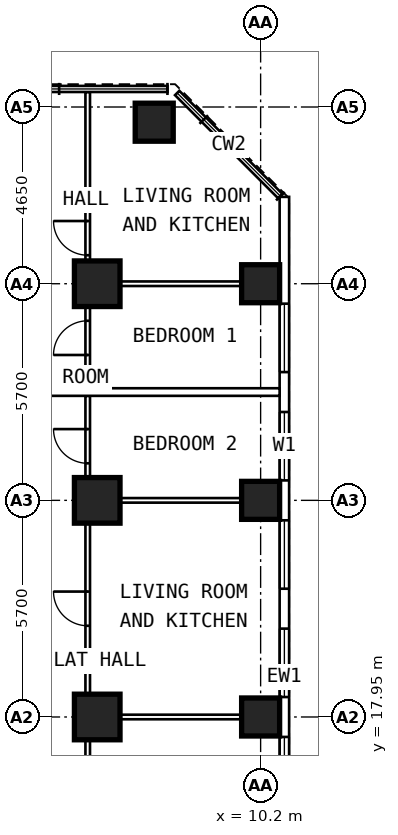
"""IFC4 building model, lengths in metres.
Left out: names, types, materials, properties, quantities, classifications, styles, units other than length and angle.
Written with IfcOpenShell. Run it as: python <this file> out.ifc"""

import sys

from ifc_helpers import new_model, si_unit, direction, frame, frame_2d, origin, origin_2d, place, context, subcontext, project, spatial, rectangle, extrude, element, fill, save


model = new_model("IFC4")
c1 = context("Model", 3, precision=1e-05, world=origin(), true_north=direction((0.0, 1.0)))
c2 = subcontext(c1, "Body", "Model", "MODEL_VIEW")
j1 = project(units=[si_unit("LENGTHUNIT", "METRE"), si_unit("PLANEANGLEUNIT", "RADIAN")], contexts=[c1])
p1 = place(None, origin())
s1 = spatial("IfcSite", under=j1, at=p1, CompositionType="ELEMENT")
p2 = place(p1, origin())
s2 = spatial("IfcBuilding", under=s1, at=p2, CompositionType="ELEMENT")
p3 = place(p2, frame((0.0, 0.0, 68.2)))
s3 = spatial("IfcBuildingStorey", under=s2, at=p3, CompositionType="ELEMENT", Elevation=68.2)
for number, where, z_axis, x_axis in (
    (1, (10.2, 17.95, 0.0), (0.0, 0.0, 1.0), (0.0, 1.0, 0.0)),
    (2, (10.2, 23.65, 0.0), (0.0, 0.0, 1.0), (0.0, 1.0, 0.0)),
    (3, (10.2, 29.35, 0.0), (0.0, 0.0, 1.0), (0.0, 1.0, 0.0)),
    (4, (7.4, 33.6, 0.0), (0.0, 0.0, 1.0), (0.0, 1.0, 0.0)),
):
    element("IfcColumn", number, at=place(p3, frame(where, z_axis=z_axis, x_axis=x_axis)), inside=s3, PredefinedType="COLUMN", context=c2, shape_type="SweptSolid", body=[
        extrude(rectangle(XDim=1.0, YDim=1.0, at=origin_2d()), origin(), (0.0, 0.0, 1.0), 3.6),
    ])
for number, where, z_axis, x_axis in (
    (5, (5.9, 17.95, 0.0), (0.0, 0.0, 1.0), (0.0, 1.0, 0.0)),
    (6, (5.9, 23.65, 0.0), (0.0, 0.0, 1.0), (0.0, 1.0, 0.0)),
    (7, (5.9, 29.35, 0.0), (0.0, 0.0, 1.0), (0.0, 1.0, 0.0)),
):
    element("IfcColumn", number, at=place(p3, frame(where, z_axis=z_axis, x_axis=x_axis)), inside=s3, PredefinedType="COLUMN", context=c2, shape_type="SweptSolid", body=[
        extrude(rectangle(XDim=1.2, YDim=1.2, at=origin_2d()), origin(), (0.0, 0.0, 1.0), 3.6),
    ])
p4 = place(p3, frame((10.825, 6.394, 0.0), z_axis=(0.0, 0.0, 1.0), x_axis=(0.0, 1.0, 0.0)))
e8 = element("IfcWall", 8, at=p4, inside=s3, PredefinedType="SOLIDWALL", context=c2, shape_type="SweptSolid", body=[
    extrude(rectangle(XDim=25.241, YDim=0.25, at=frame_2d((12.621, 0.0))), origin(), (0.0, 0.0, 1.0), 3.35),
])
p5 = place(p4, frame((0.681, 0.0, 0.8)))
e9 = element("IfcOpeningElement", 9, at=p5, cuts=e8, PredefinedType="OPENING", context=c2, shape_type="SweptSolid", body=[
    extrude(rectangle(XDim=1.8, YDim=1.8, at=frame_2d((0.9, 0.9))), frame((0.0, 0.137, 0.0), z_axis=(0.0, -1.0, 0.0), x_axis=(1.0, 0.0, 0.0)), (0.0, 0.0, 1.0), 0.274),
])
p6 = place(p4, frame((3.531, 0.0, 0.8)))
e10 = element("IfcOpeningElement", 10, at=p6, cuts=e8, PredefinedType="OPENING", context=c2, shape_type="SweptSolid", body=[
    extrude(rectangle(XDim=1.8, YDim=1.8, at=frame_2d((0.9, 0.9))), frame((0.0, 0.137, 0.0), z_axis=(0.0, -1.0, 0.0), x_axis=(1.0, 0.0, 0.0)), (0.0, 0.0, 1.0), 0.274),
])
p7 = place(p4, frame((6.381, 0.0, 0.8)))
e11 = element("IfcOpeningElement", 11, at=p7, cuts=e8, PredefinedType="OPENING", context=c2, shape_type="SweptSolid", body=[
    extrude(rectangle(XDim=1.8, YDim=1.8, at=frame_2d((0.9, 0.9))), frame((0.0, 0.137, 0.0), z_axis=(0.0, -1.0, 0.0), x_axis=(1.0, 0.0, 0.0)), (0.0, 0.0, 1.0), 0.274),
])
p8 = place(p4, frame((9.231, 0.0, 0.8)))
e12 = element("IfcOpeningElement", 12, at=p8, cuts=e8, PredefinedType="OPENING", context=c2, shape_type="SweptSolid", body=[
    extrude(rectangle(XDim=1.8, YDim=1.8, at=frame_2d((0.9, 0.9))), frame((0.0, 0.137, 0.0), z_axis=(0.0, -1.0, 0.0), x_axis=(1.0, 0.0, 0.0)), (0.0, 0.0, 1.0), 0.274),
])
p9 = place(p4, frame((12.081, 0.0, 0.8)))
e13 = element("IfcOpeningElement", 13, at=p9, cuts=e8, PredefinedType="OPENING", context=c2, shape_type="SweptSolid", body=[
    extrude(rectangle(XDim=1.8, YDim=1.8, at=frame_2d((0.9, 0.9))), frame((0.0, 0.137, 0.0), z_axis=(0.0, -1.0, 0.0), x_axis=(1.0, 0.0, 0.0)), (0.0, 0.0, 1.0), 0.274),
])
p10 = place(p4, frame((14.931, 0.0, 0.8)))
e14 = element("IfcOpeningElement", 14, at=p10, cuts=e8, PredefinedType="OPENING", context=c2, shape_type="SweptSolid", body=[
    extrude(rectangle(XDim=1.8, YDim=1.8, at=frame_2d((0.9, 0.9))), frame((0.0, 0.137, 0.0), z_axis=(0.0, -1.0, 0.0), x_axis=(1.0, 0.0, 0.0)), (0.0, 0.0, 1.0), 0.274),
])
p11 = place(p4, frame((17.781, 0.0, 0.8)))
e15 = element("IfcOpeningElement", 15, at=p11, cuts=e8, PredefinedType="OPENING", context=c2, shape_type="SweptSolid", body=[
    extrude(rectangle(XDim=1.8, YDim=1.8, at=frame_2d((0.9, 0.9))), frame((0.0, 0.137, 0.0), z_axis=(0.0, -1.0, 0.0), x_axis=(1.0, 0.0, 0.0)), (0.0, 0.0, 1.0), 0.274),
])
p12 = place(p4, frame((20.631, 0.0, 0.8)))
e16 = element("IfcOpeningElement", 16, at=p12, cuts=e8, PredefinedType="OPENING", context=c2, shape_type="SweptSolid", body=[
    extrude(rectangle(XDim=1.8, YDim=1.8, at=frame_2d((0.9, 0.9))), frame((0.0, 0.137, 0.0), z_axis=(0.0, -1.0, 0.0), x_axis=(1.0, 0.0, 0.0)), (0.0, 0.0, 1.0), 0.274),
])
p13 = place(p3, frame((5.65, 9.6, 0.0), z_axis=(0.0, 0.0, 1.0), x_axis=(0.0, 1.0, 0.0)))
e17 = element("IfcWall", 17, at=p13, inside=s3, PredefinedType="PARTITIONING", context=c2, shape_type="SweptSolid", body=[
    extrude(rectangle(XDim=16.8, YDim=0.12, at=frame_2d((8.4, 0.0))), origin(), (0.0, 0.0, 1.0), 3.35),
])
p14 = place(p13, frame((1.0, 0.0, 0.0)))
e18 = element("IfcOpeningElement", 18, at=p14, cuts=e17, PredefinedType="OPENING", context=c2, shape_type="SweptSolid", body=[
    extrude(rectangle(XDim=0.9, YDim=2.1, at=frame_2d((0.45, 1.05))), frame((0.0, 0.072, 0.0), z_axis=(0.0, -1.0, 0.0), x_axis=(1.0, 0.0, 0.0)), (0.0, 0.0, 1.0), 0.144),
])
p15 = place(p13, frame((5.05, 0.0, 0.0)))
e19 = element("IfcOpeningElement", 19, at=p15, cuts=e17, PredefinedType="OPENING", context=c2, shape_type="SweptSolid", body=[
    extrude(rectangle(XDim=0.9, YDim=2.1, at=frame_2d((0.45, 1.05))), frame((0.0, 0.072, 0.0), z_axis=(0.0, -1.0, 0.0), x_axis=(1.0, 0.0, 0.0)), (0.0, 0.0, 1.0), 0.144),
])
p16 = place(p13, frame((10.75, 0.0, 0.0)))
e20 = element("IfcOpeningElement", 20, at=p16, cuts=e17, PredefinedType="OPENING", context=c2, shape_type="SweptSolid", body=[
    extrude(rectangle(XDim=0.9, YDim=2.1, at=frame_2d((0.45, 1.05))), frame((0.0, 0.072, 0.0), z_axis=(0.0, -1.0, 0.0), x_axis=(1.0, 0.0, 0.0)), (0.0, 0.0, 1.0), 0.144),
])
p17 = place(p13, frame((15.025, 0.0, 0.0)))
e21 = element("IfcOpeningElement", 21, at=p17, cuts=e17, PredefinedType="OPENING", context=c2, shape_type="SweptSolid", body=[
    extrude(rectangle(XDim=0.9, YDim=2.1, at=frame_2d((0.45, 1.05))), frame((0.0, 0.072, 0.0), z_axis=(0.0, -1.0, 0.0), x_axis=(1.0, 0.0, 0.0)), (0.0, 0.0, 1.0), 0.144),
])
for number, where, z_axis, x_axis in (
    (22, (5.71, 17.95, 0.0), (0.0, 0.0, 1.0), (1.0, 0.0, 0.0)),
    (23, (5.71, 23.65, 0.0), (0.0, 0.0, 1.0), (1.0, 0.0, 0.0)),
):
    element("IfcWall", number, at=place(p3, frame(where, z_axis=z_axis, x_axis=x_axis)), inside=s3, PredefinedType="PARTITIONING", context=c2, shape_type="SweptSolid", body=[
        extrude(rectangle(XDim=4.99, YDim=0.12, at=frame_2d((2.495, 0.0))), origin(), (0.0, 0.0, 1.0), 2.45),
    ])
p18 = place(p3, frame((5.65, 26.6, 0.0), z_axis=(0.0, 0.0, 1.0), x_axis=(0.0, 1.0, 0.0)))
e24 = element("IfcWall", 24, at=p18, inside=s3, PredefinedType="PARTITIONING", context=c2, shape_type="SweptSolid", body=[
    extrude(rectangle(XDim=7.795, YDim=0.12, at=frame_2d((3.897, 0.0))), origin(), (0.0, 0.0, 1.0), 3.35),
])
p19 = place(p18, frame((0.875, 0.0, 0.0)))
e25 = element("IfcOpeningElement", 25, at=p19, cuts=e24, PredefinedType="OPENING", context=c2, shape_type="SweptSolid", body=[
    extrude(rectangle(XDim=0.9, YDim=2.1, at=frame_2d((0.45, 1.05))), frame((0.0, 0.072, 0.0), z_axis=(0.0, -1.0, 0.0), x_axis=(1.0, 0.0, 0.0)), (0.0, 0.0, 1.0), 0.144),
])
p20 = place(p18, frame((3.5, 0.0, 0.0)))
e26 = element("IfcOpeningElement", 26, at=p20, cuts=e24, PredefinedType="OPENING", context=c2, shape_type="SweptSolid", body=[
    extrude(rectangle(XDim=0.9, YDim=2.1, at=frame_2d((0.45, 1.05))), frame((0.0, 0.072, 0.0), z_axis=(0.0, -1.0, 0.0), x_axis=(1.0, 0.0, 0.0)), (0.0, 0.0, 1.0), 0.144),
])
p21 = place(p3, frame((5.71, 29.35, 0.0), z_axis=(0.0, 0.0, 1.0), x_axis=(1.0, 0.0, 0.0)))
e27 = element("IfcWall", 27, at=p21, inside=s3, PredefinedType="PARTITIONING", context=c2, shape_type="SweptSolid", body=[
    extrude(rectangle(XDim=4.99, YDim=0.12, at=frame_2d((2.495, 0.0))), origin(), (0.0, 0.0, 1.0), 2.45),
])
p22 = place(p3, frame((2.1, 26.5, 0.0), z_axis=(0.0, 0.0, 1.0), x_axis=(1.0, 0.0, 0.0)))
e28 = element("IfcWall", 28, at=p22, inside=s3, PredefinedType="PARTITIONING", context=c2, shape_type="SweptSolid", body=[
    extrude(rectangle(XDim=8.6, YDim=0.2, at=frame_2d((4.3, 0.0))), origin(), (0.0, 0.0, 1.0), 3.35),
])
p23 = place(p8, origin())
e29 = element("IfcWindow", 29, at=p23, inside=s3, PartitioningType="SINGLE_PANEL", PredefinedType="WINDOW", context=c2, shape_type="SweptSolid", body=[
    extrude(rectangle(XDim=1.8, YDim=1.8, at=frame_2d((0.9, 0.9))), frame((0.0, 0.03, 0.0), z_axis=(0.0, -1.0, 0.0), x_axis=(1.0, 0.0, 0.0)), (0.0, 0.0, 1.0), 0.06),
])
fill(e12, e29)
p24 = place(p9, origin())
e30 = element("IfcWindow", 30, at=p24, inside=s3, PartitioningType="SINGLE_PANEL", PredefinedType="WINDOW", context=c2, shape_type="SweptSolid", body=[
    extrude(rectangle(XDim=1.8, YDim=1.8, at=frame_2d((0.9, 0.9))), frame((0.0, 0.03, 0.0), z_axis=(0.0, -1.0, 0.0), x_axis=(1.0, 0.0, 0.0)), (0.0, 0.0, 1.0), 0.06),
])
fill(e13, e30)
p25 = place(p10, origin())
e31 = element("IfcWindow", 31, at=p25, inside=s3, PartitioningType="SINGLE_PANEL", PredefinedType="WINDOW", context=c2, shape_type="SweptSolid", body=[
    extrude(rectangle(XDim=1.8, YDim=1.8, at=frame_2d((0.9, 0.9))), frame((0.0, 0.03, 0.0), z_axis=(0.0, -1.0, 0.0), x_axis=(1.0, 0.0, 0.0)), (0.0, 0.0, 1.0), 0.06),
])
fill(e14, e31)
p26 = place(p11, origin())
e32 = element("IfcWindow", 32, at=p26, inside=s3, PartitioningType="SINGLE_PANEL", PredefinedType="WINDOW", context=c2, shape_type="SweptSolid", body=[
    extrude(rectangle(XDim=1.8, YDim=1.8, at=frame_2d((0.9, 0.9))), frame((0.0, 0.03, 0.0), z_axis=(0.0, -1.0, 0.0), x_axis=(1.0, 0.0, 0.0)), (0.0, 0.0, 1.0), 0.06),
])
fill(e15, e32)
p27 = place(p12, origin())
e33 = element("IfcWindow", 33, at=p27, inside=s3, PartitioningType="SINGLE_PANEL", PredefinedType="WINDOW", context=c2, shape_type="SweptSolid", body=[
    extrude(rectangle(XDim=1.8, YDim=1.8, at=frame_2d((0.9, 0.9))), frame((0.0, 0.03, 0.0), z_axis=(0.0, -1.0, 0.0), x_axis=(1.0, 0.0, 0.0)), (0.0, 0.0, 1.0), 0.06),
])
fill(e16, e33)
p28 = place(p16, origin())
e34 = element("IfcDoor", 34, at=p28, inside=s3, OperationType="SINGLE_SWING_RIGHT", PredefinedType="DOOR", context=c2, shape_type="SweptSolid", body=[
    extrude(rectangle(XDim=0.9, YDim=2.1, at=frame_2d((0.45, 1.05))), frame((0.0, 0.025, 0.0), z_axis=(0.0, -1.0, 0.0), x_axis=(1.0, 0.0, 0.0)), (0.0, 0.0, 1.0), 0.05),
])
fill(e20, e34)
p29 = place(p17, origin())
e35 = element("IfcDoor", 35, at=p29, inside=s3, OperationType="SINGLE_SWING_RIGHT", PredefinedType="DOOR", context=c2, shape_type="SweptSolid", body=[
    extrude(rectangle(XDim=0.9, YDim=2.1, at=frame_2d((0.45, 1.05))), frame((0.0, 0.025, 0.0), z_axis=(0.0, -1.0, 0.0), x_axis=(1.0, 0.0, 0.0)), (0.0, 0.0, 1.0), 0.05),
])
fill(e21, e35)
p30 = place(p19, origin())
e36 = element("IfcDoor", 36, at=p30, inside=s3, OperationType="SINGLE_SWING_LEFT", PredefinedType="DOOR", context=c2, shape_type="SweptSolid", body=[
    extrude(rectangle(XDim=0.9, YDim=2.1, at=frame_2d((0.45, 1.05))), frame((0.0, 0.025, 0.0), z_axis=(0.0, -1.0, 0.0), x_axis=(1.0, 0.0, 0.0)), (0.0, 0.0, 1.0), 0.05),
])
fill(e25, e36)
p31 = place(p20, origin())
e37 = element("IfcDoor", 37, at=p31, inside=s3, OperationType="SINGLE_SWING_RIGHT", PredefinedType="DOOR", context=c2, shape_type="SweptSolid", body=[
    extrude(rectangle(XDim=0.9, YDim=2.1, at=frame_2d((0.45, 1.05))), frame((0.0, 0.025, 0.0), z_axis=(0.0, -1.0, 0.0), x_axis=(1.0, 0.0, 0.0)), (0.0, 0.0, 1.0), 0.05),
])
fill(e26, e37)
save(model, sys.argv[1])
